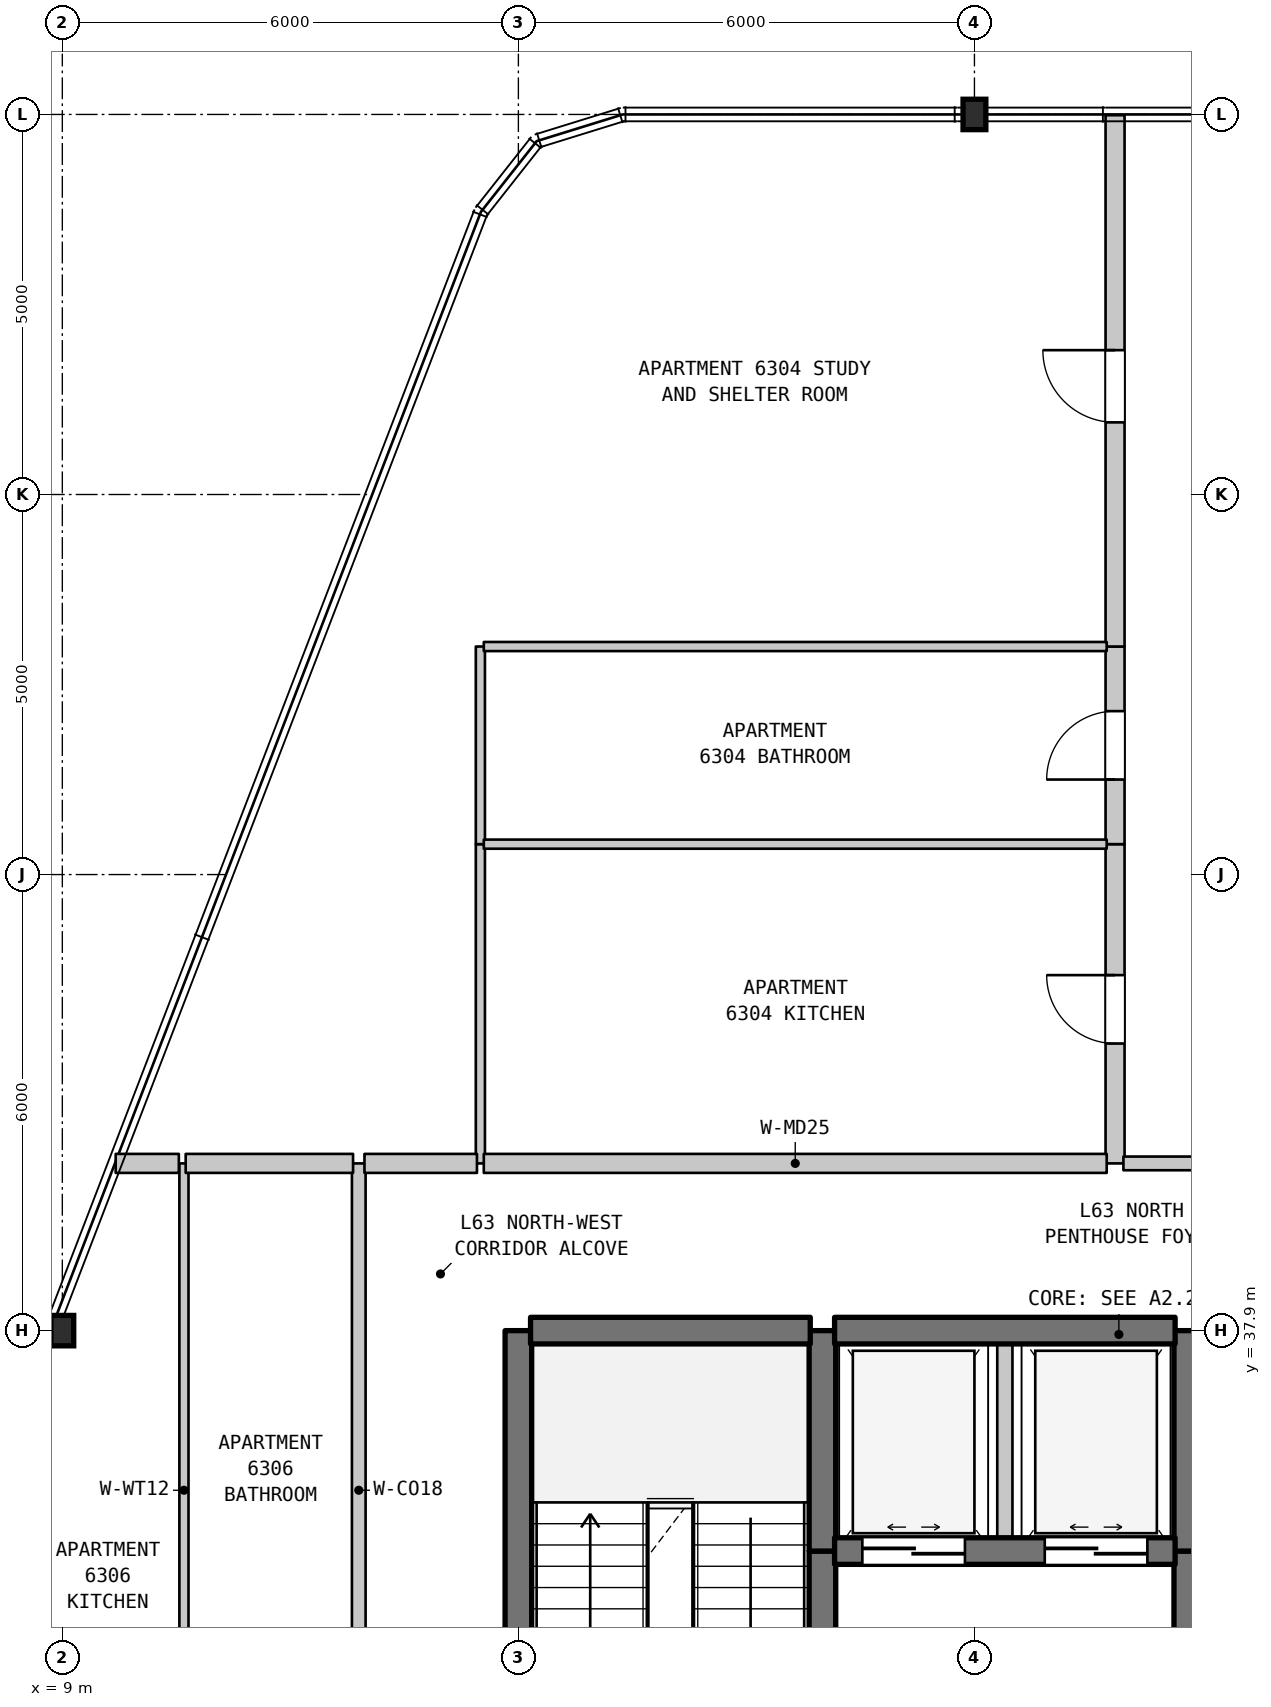
"""IFC4 building model, lengths in metres.
Left out: names, types, materials, properties, quantities, classifications, styles, units other than length and angle.
Written with IfcOpenShell. Run it as: python <this file> out.ifc"""

import sys

from ifc_helpers import new_model, si_unit, direction, frame, frame_2d, origin, origin_2d, place, context, subcontext, project, spatial, rectangle, i_section, extrude, element, fill, save


model = new_model("IFC4")
c1 = context("Model", 3, precision=1e-05, world=origin(), true_north=direction((0.0, 1.0)))
c2 = subcontext(c1, "Body", "Model", "MODEL_VIEW")
j1 = project(units=[si_unit("LENGTHUNIT", "METRE"), si_unit("PLANEANGLEUNIT", "RADIAN")], contexts=[c1])
p1 = place(None, origin())
s1 = spatial("IfcSite", under=j1, at=p1, CompositionType="ELEMENT")
p2 = place(p1, origin())
s2 = spatial("IfcBuilding", under=s1, at=p2, CompositionType="ELEMENT")
p3 = place(p2, frame((0.0, 0.0, 254.7)))
s3 = spatial("IfcBuildingStorey", under=s2, at=p3, CompositionType="ELEMENT", Elevation=254.7)
for number, where, z_axis, x_axis in (
    (1, (9.0, 37.9, 0.0), (0.0, 0.0, 1.0), (1.0, 0.0, 0.0)),
    (2, (21.0, 53.9, 0.0), (0.0, 0.0, 1.0), (1.0, 0.0, 0.0)),
):
    element("IfcColumn", number, at=place(p3, frame(where, z_axis=z_axis, x_axis=x_axis)), inside=s3, PredefinedType="COLUMN", context=c2, shape_type="SweptSolid", body=[
        extrude(i_section(OverallWidth=0.3, OverallDepth=0.4, WebThickness=0.013, FlangeThickness=0.024, FilletRadius=0.027, at=origin_2d()), origin(), (0.0, 0.0, 1.0), 3.7),
    ])
p4 = place(p3, frame((10.6, 31.5, 0.0), z_axis=(0.0, 0.0, 1.0), x_axis=(0.0, 1.0, 0.0)))
e3 = element("IfcWall", 3, at=p4, inside=s3, PredefinedType="PARTITIONING", context=c2, shape_type="SweptSolid", body=[
    extrude(rectangle(XDim=8.6, YDim=0.12, at=frame_2d((4.3, 0.0))), origin(), (0.0, 0.0, 1.0), 3.39),
])
p5 = place(p3, frame((12.9, 31.5, 0.0), z_axis=(0.0, 0.0, 1.0), x_axis=(0.0, 1.0, 0.0)))
e4 = element("IfcWall", 4, at=p5, inside=s3, PredefinedType="STANDARD", context=c2, shape_type="SweptSolid", body=[
    extrude(rectangle(XDim=8.6, YDim=0.18, at=frame_2d((4.3, 0.0))), origin(), (0.0, 0.0, 1.0), 3.39),
])
p6 = place(p3, frame((14.5, 40.1, 0.0), z_axis=(0.0, 0.0, 1.0), x_axis=(0.0, 1.0, 0.0)))
e5 = element("IfcWall", 5, at=p6, inside=s3, PredefinedType="PARTITIONING", context=c2, shape_type="SweptSolid", body=[
    extrude(rectangle(XDim=4.2, YDim=0.12, at=frame_2d((2.1, 0.0))), origin(), (0.0, 0.0, 1.0), 3.39),
])
p7 = place(p3, frame((14.5, 44.3, 0.0), z_axis=(0.0, 0.0, 1.0), x_axis=(0.0, 1.0, 0.0)))
e6 = element("IfcWall", 6, at=p7, inside=s3, PredefinedType="PARTITIONING", context=c2, shape_type="SweptSolid", body=[
    extrude(rectangle(XDim=2.6, YDim=0.12, at=frame_2d((1.3, 0.0))), origin(), (0.0, 0.0, 1.0), 3.39),
])
p8 = place(p3, frame((15.0, 31.1, 0.0), z_axis=(0.0, 0.0, 1.0), x_axis=(0.0, 1.0, 0.0)))
e7 = element("IfcWall", 7, at=p8, inside=s3, PredefinedType="SHEAR", context=c2, shape_type="SweptSolid", body=[
    extrude(rectangle(XDim=6.8, YDim=0.35, at=frame_2d((3.4, 0.0))), origin(), (0.0, 0.0, 1.0), 3.39),
])
p9 = place(p3, frame((19.0, 29.5, 0.0), z_axis=(0.0, 0.0, 1.0), x_axis=(0.0, 1.0, 0.0)))
e8 = element("IfcWall", 8, at=p9, inside=s3, PredefinedType="SHEAR", context=c2, shape_type="SweptSolid", body=[
    extrude(rectangle(XDim=5.5, YDim=0.35, at=frame_2d((2.75, 0.0))), origin(), (0.0, 0.0, 1.0), 3.39),
])
p10 = place(p9, frame((2.025, 0.0, 0.0)))
e9 = element("IfcOpeningElement", 9, at=p10, cuts=e8, PredefinedType="OPENING", context=c2, shape_type="SweptSolid", body=[
    extrude(rectangle(XDim=1.1, YDim=2.15, at=frame_2d((0.55, 1.075))), frame((0.0, 0.185, 0.0), z_axis=(0.0, -1.0, 0.0), x_axis=(1.0, 0.0, 0.0)), (0.0, 0.0, 1.0), 0.37),
])
p11 = place(p3, frame((19.0, 35.0, 0.0), z_axis=(0.0, 0.0, 1.0), x_axis=(0.0, 1.0, 0.0)))
e10 = element("IfcWall", 10, at=p11, inside=s3, PredefinedType="SHEAR", context=c2, shape_type="SweptSolid", body=[
    extrude(rectangle(XDim=2.9, YDim=0.35, at=frame_2d((1.45, 0.0))), origin(), (0.0, 0.0, 1.0), 3.39),
])
p12 = place(p3, frame((21.4, 35.0, 0.0), z_axis=(0.0, 0.0, 1.0), x_axis=(0.0, 1.0, 0.0)))
e11 = element("IfcWall", 11, at=p12, inside=s3, PredefinedType="STANDARD", context=c2, shape_type="SweptSolid", body=[
    extrude(rectangle(XDim=2.9, YDim=0.2, at=frame_2d((1.45, 0.0))), origin(), (0.0, 0.0, 1.0), 3.39),
])
p13 = place(p3, frame((22.85, 40.1, 0.0), z_axis=(0.0, 0.0, 1.0), x_axis=(0.0, 1.0, 0.0)))
e12 = element("IfcWall", 12, at=p13, inside=s3, PredefinedType="STANDARD", context=c2, shape_type="SweptSolid", body=[
    extrude(rectangle(XDim=4.2, YDim=0.25, at=frame_2d((2.1, 0.0))), origin(), (0.0, 0.0, 1.0), 3.39),
])
p14 = place(p13, frame((1.577, 0.0, 0.0)))
e13 = element("IfcOpeningElement", 13, at=p14, cuts=e12, PredefinedType="OPENING", context=c2, shape_type="SweptSolid", body=[
    extrude(rectangle(XDim=0.9, YDim=2.15, at=frame_2d((0.45, 1.075))), frame((0.0, 0.135, 0.0), z_axis=(0.0, -1.0, 0.0), x_axis=(1.0, 0.0, 0.0)), (0.0, 0.0, 1.0), 0.27),
])
p15 = place(p3, frame((22.85, 44.3, 0.0), z_axis=(0.0, 0.0, 1.0), x_axis=(0.0, 1.0, 0.0)))
e14 = element("IfcWall", 14, at=p15, inside=s3, PredefinedType="STANDARD", context=c2, shape_type="SweptSolid", body=[
    extrude(rectangle(XDim=2.6, YDim=0.25, at=frame_2d((1.3, 0.0))), origin(), (0.0, 0.0, 1.0), 3.39),
])
p16 = place(p15, frame((0.85, 0.0, 0.0)))
e15 = element("IfcOpeningElement", 15, at=p16, cuts=e14, PredefinedType="OPENING", context=c2, shape_type="SweptSolid", body=[
    extrude(rectangle(XDim=0.9, YDim=2.1, at=frame_2d((0.45, 1.05))), frame((0.0, 0.135, 0.0), z_axis=(0.0, -1.0, 0.0), x_axis=(1.0, 0.0, 0.0)), (0.0, 0.0, 1.0), 0.27),
])
p17 = place(p3, frame((22.85, 46.9, 0.0), z_axis=(0.0, 0.0, 1.0), x_axis=(0.0, 1.0, 0.0)))
e16 = element("IfcWall", 16, at=p17, inside=s3, PredefinedType="STANDARD", context=c2, shape_type="SweptSolid", body=[
    extrude(rectangle(XDim=6.99, YDim=0.25, at=frame_2d((3.495, 0.0))), origin(), (0.0, 0.0, 1.0), 3.39),
])
p18 = place(p17, frame((2.949, 0.0, 0.0)))
e17 = element("IfcOpeningElement", 17, at=p18, cuts=e16, PredefinedType="OPENING", context=c2, shape_type="SweptSolid", body=[
    extrude(rectangle(XDim=0.95, YDim=2.15, at=frame_2d((0.475, 1.075))), frame((0.0, 0.135, 0.0), z_axis=(0.0, -1.0, 0.0), x_axis=(1.0, 0.0, 0.0)), (0.0, 0.0, 1.0), 0.27),
])
p19 = place(p3, frame((23.8, 31.5, 0.0), z_axis=(0.0, 0.0, 1.0), x_axis=(0.0, 1.0, 0.0)))
e18 = element("IfcWall", 18, at=p19, inside=s3, PredefinedType="SHEAR", context=c2, shape_type="SweptSolid", body=[
    extrude(rectangle(XDim=3.5, YDim=0.35, at=frame_2d((1.75, 0.0))), origin(), (0.0, 0.0, 1.0), 3.39),
])
p20 = place(p19, frame((1.127, 0.0, 0.0)))
e19 = element("IfcOpeningElement", 19, at=p20, cuts=e18, PredefinedType="OPENING", context=c2, shape_type="SweptSolid", body=[
    extrude(rectangle(XDim=1.1, YDim=2.15, at=frame_2d((0.55, 1.075))), frame((0.0, 0.185, 0.0), z_axis=(0.0, -1.0, 0.0), x_axis=(1.0, 0.0, 0.0)), (0.0, 0.0, 1.0), 0.37),
])
p21 = place(p3, frame((23.8, 35.0, 0.0), z_axis=(0.0, 0.0, 1.0), x_axis=(0.0, 1.0, 0.0)))
e20 = element("IfcWall", 20, at=p21, inside=s3, PredefinedType="SHEAR", context=c2, shape_type="SweptSolid", body=[
    extrude(rectangle(XDim=2.9, YDim=0.35, at=frame_2d((1.45, 0.0))), origin(), (0.0, 0.0, 1.0), 3.39),
])
p22 = place(p3, frame((19.16, 35.0, 0.0), z_axis=(0.0, 0.0, 1.0), x_axis=(1.0, 0.0, 0.0)))
e21 = element("IfcWall", 21, at=p22, inside=s3, PredefinedType="SHEAR", context=c2, shape_type="SweptSolid", body=[
    extrude(rectangle(XDim=4.48, YDim=0.35, at=frame_2d((2.24, 0.0))), origin(), (0.0, 0.0, 1.0), 3.39),
])
p23 = place(p22, frame((0.365, 0.0, 0.0)))
e22 = element("IfcOpeningElement", 22, at=p23, cuts=e21, PredefinedType="OPENING", context=c2, shape_type="SweptSolid", body=[
    extrude(rectangle(XDim=1.35, YDim=2.2, at=frame_2d((0.675, 1.1))), frame((0.0, 0.185, 0.0), z_axis=(0.0, -1.0, 0.0), x_axis=(1.0, 0.0, 0.0)), (0.0, 0.0, 1.0), 0.37),
])
p24 = place(p22, frame((2.765, 0.0, 0.0)))
e23 = element("IfcOpeningElement", 23, at=p24, cuts=e21, PredefinedType="OPENING", context=c2, shape_type="SweptSolid", body=[
    extrude(rectangle(XDim=1.35, YDim=2.2, at=frame_2d((0.675, 1.1))), frame((0.0, 0.185, 0.0), z_axis=(0.0, -1.0, 0.0), x_axis=(1.0, 0.0, 0.0)), (0.0, 0.0, 1.0), 0.37),
])
p25 = place(p3, frame((15.16, 37.9, 0.0), z_axis=(0.0, 0.0, 1.0), x_axis=(1.0, 0.0, 0.0)))
e24 = element("IfcWall", 24, at=p25, inside=s3, PredefinedType="SHEAR", context=c2, shape_type="SweptSolid", body=[
    extrude(rectangle(XDim=3.68, YDim=0.35, at=frame_2d((1.84, 0.0))), origin(), (0.0, 0.0, 1.0), 3.39),
])
p26 = place(p3, frame((19.16, 37.9, 0.0), z_axis=(0.0, 0.0, 1.0), x_axis=(1.0, 0.0, 0.0)))
e25 = element("IfcWall", 25, at=p26, inside=s3, PredefinedType="SHEAR", context=c2, shape_type="SweptSolid", body=[
    extrude(rectangle(XDim=4.48, YDim=0.35, at=frame_2d((2.24, 0.0))), origin(), (0.0, 0.0, 1.0), 3.39),
])
p27 = place(p3, frame((9.702, 40.1, 0.0), z_axis=(0.0, 0.0, 1.0), x_axis=(1.0, 0.0, 0.0)))
e26 = element("IfcWall", 26, at=p27, inside=s3, PredefinedType="STANDARD", context=c2, shape_type="SweptSolid", body=[
    extrude(rectangle(XDim=0.831, YDim=0.25, at=frame_2d((0.416, 0.0))), origin(), (0.0, 0.0, 1.0), 3.39),
])
p28 = place(p3, frame((10.623, 40.1, 0.0), z_axis=(0.0, 0.0, 1.0), x_axis=(1.0, 0.0, 0.0)))
e27 = element("IfcWall", 27, at=p28, inside=s3, PredefinedType="STANDARD", context=c2, shape_type="SweptSolid", body=[
    extrude(rectangle(XDim=2.202, YDim=0.25, at=frame_2d((1.101, 0.0))), origin(), (0.0, 0.0, 1.0), 3.39),
])
p29 = place(p3, frame((12.975, 40.1, 0.0), z_axis=(0.0, 0.0, 1.0), x_axis=(1.0, 0.0, 0.0)))
e28 = element("IfcWall", 28, at=p29, inside=s3, PredefinedType="STANDARD", context=c2, shape_type="SweptSolid", body=[
    extrude(rectangle(XDim=1.48, YDim=0.25, at=frame_2d((0.74, 0.0))), origin(), (0.0, 0.0, 1.0), 3.39),
])
p30 = place(p3, frame((14.545, 40.1, 0.0), z_axis=(0.0, 0.0, 1.0), x_axis=(1.0, 0.0, 0.0)))
e29 = element("IfcWall", 29, at=p30, inside=s3, PredefinedType="STANDARD", context=c2, shape_type="SweptSolid", body=[
    extrude(rectangle(XDim=8.195, YDim=0.25, at=frame_2d((4.098, 0.0))), origin(), (0.0, 0.0, 1.0), 3.39),
])
p31 = place(p3, frame((22.96, 40.1, 0.0), z_axis=(0.0, 0.0, 1.0), x_axis=(1.0, 0.0, 0.0)))
e30 = element("IfcWall", 30, at=p31, inside=s3, PredefinedType="STANDARD", context=c2, shape_type="SweptSolid", body=[
    extrude(rectangle(XDim=5.845, YDim=0.18, at=frame_2d((2.922, 0.0))), origin(), (0.0, 0.0, 1.0), 3.39),
])
p32 = place(p31, frame((2.39, 0.0, 0.0)))
e31 = element("IfcOpeningElement", 31, at=p32, cuts=e30, PredefinedType="OPENING", context=c2, shape_type="SweptSolid", body=[
    extrude(rectangle(XDim=1.0, YDim=2.15, at=frame_2d((0.5, 1.075))), frame((0.0, 0.1, 0.0), z_axis=(0.0, -1.0, 0.0), x_axis=(1.0, 0.0, 0.0)), (0.0, 0.0, 1.0), 0.2),
])
for number, where, z_axis, x_axis in (
    (32, (14.545, 44.3, 0.0), (0.0, 0.0, 1.0), (1.0, 0.0, 0.0)),
    (33, (14.545, 46.9, 0.0), (0.0, 0.0, 1.0), (1.0, 0.0, 0.0)),
):
    element("IfcWall", number, at=place(p3, frame(where, z_axis=z_axis, x_axis=x_axis)), inside=s3, PredefinedType="PARTITIONING", context=c2, shape_type="SweptSolid", body=[
        extrude(rectangle(XDim=8.195, YDim=0.12, at=frame_2d((4.098, 0.0))), origin(), (0.0, 0.0, 1.0), 3.39),
    ])
p33 = place(p14, origin())
e34 = element("IfcDoor", 34, at=p33, inside=s3, OperationType="SINGLE_SWING_RIGHT", PredefinedType="DOOR", context=c2, shape_type="SweptSolid", body=[
    extrude(rectangle(XDim=0.9, YDim=2.15, at=frame_2d((0.45, 1.075))), frame((0.0, 0.025, 0.0), z_axis=(0.0, -1.0, 0.0), x_axis=(1.0, 0.0, 0.0)), (0.0, 0.0, 1.0), 0.05),
])
fill(e13, e34)
p34 = place(p16, origin())
e35 = element("IfcDoor", 35, at=p34, inside=s3, OperationType="SINGLE_SWING_LEFT", PredefinedType="DOOR", context=c2, shape_type="SweptSolid", body=[
    extrude(rectangle(XDim=0.9, YDim=2.1, at=frame_2d((0.45, 1.05))), frame((0.0, 0.025, 0.0), z_axis=(0.0, -1.0, 0.0), x_axis=(1.0, 0.0, 0.0)), (0.0, 0.0, 1.0), 0.05),
])
fill(e15, e35)
p35 = place(p18, origin())
e36 = element("IfcDoor", 36, at=p35, inside=s3, OperationType="SINGLE_SWING_RIGHT", PredefinedType="DOOR", context=c2, shape_type="SweptSolid", body=[
    extrude(rectangle(XDim=0.95, YDim=2.15, at=frame_2d((0.475, 1.075))), frame((0.0, 0.025, 0.0), z_axis=(0.0, -1.0, 0.0), x_axis=(1.0, 0.0, 0.0)), (0.0, 0.0, 1.0), 0.05),
])
fill(e17, e36)
p36 = place(p23, origin())
e37 = element("IfcDoor", 37, at=p36, inside=s3, OperationType="DOUBLE_DOOR_SLIDING", PredefinedType="DOOR", context=c2, shape_type="SweptSolid", body=[
    extrude(rectangle(XDim=1.35, YDim=2.2, at=frame_2d((0.675, 1.1))), frame((0.0, 0.025, 0.0), z_axis=(0.0, -1.0, 0.0), x_axis=(1.0, 0.0, 0.0)), (0.0, 0.0, 1.0), 0.05),
])
fill(e22, e37)
p37 = place(p24, origin())
e38 = element("IfcDoor", 38, at=p37, inside=s3, OperationType="DOUBLE_DOOR_SLIDING", PredefinedType="DOOR", context=c2, shape_type="SweptSolid", body=[
    extrude(rectangle(XDim=1.35, YDim=2.2, at=frame_2d((0.675, 1.1))), frame((0.0, 0.025, 0.0), z_axis=(0.0, -1.0, 0.0), x_axis=(1.0, 0.0, 0.0)), (0.0, 0.0, 1.0), 0.05),
])
fill(e23, e38)
save(model, sys.argv[1])
